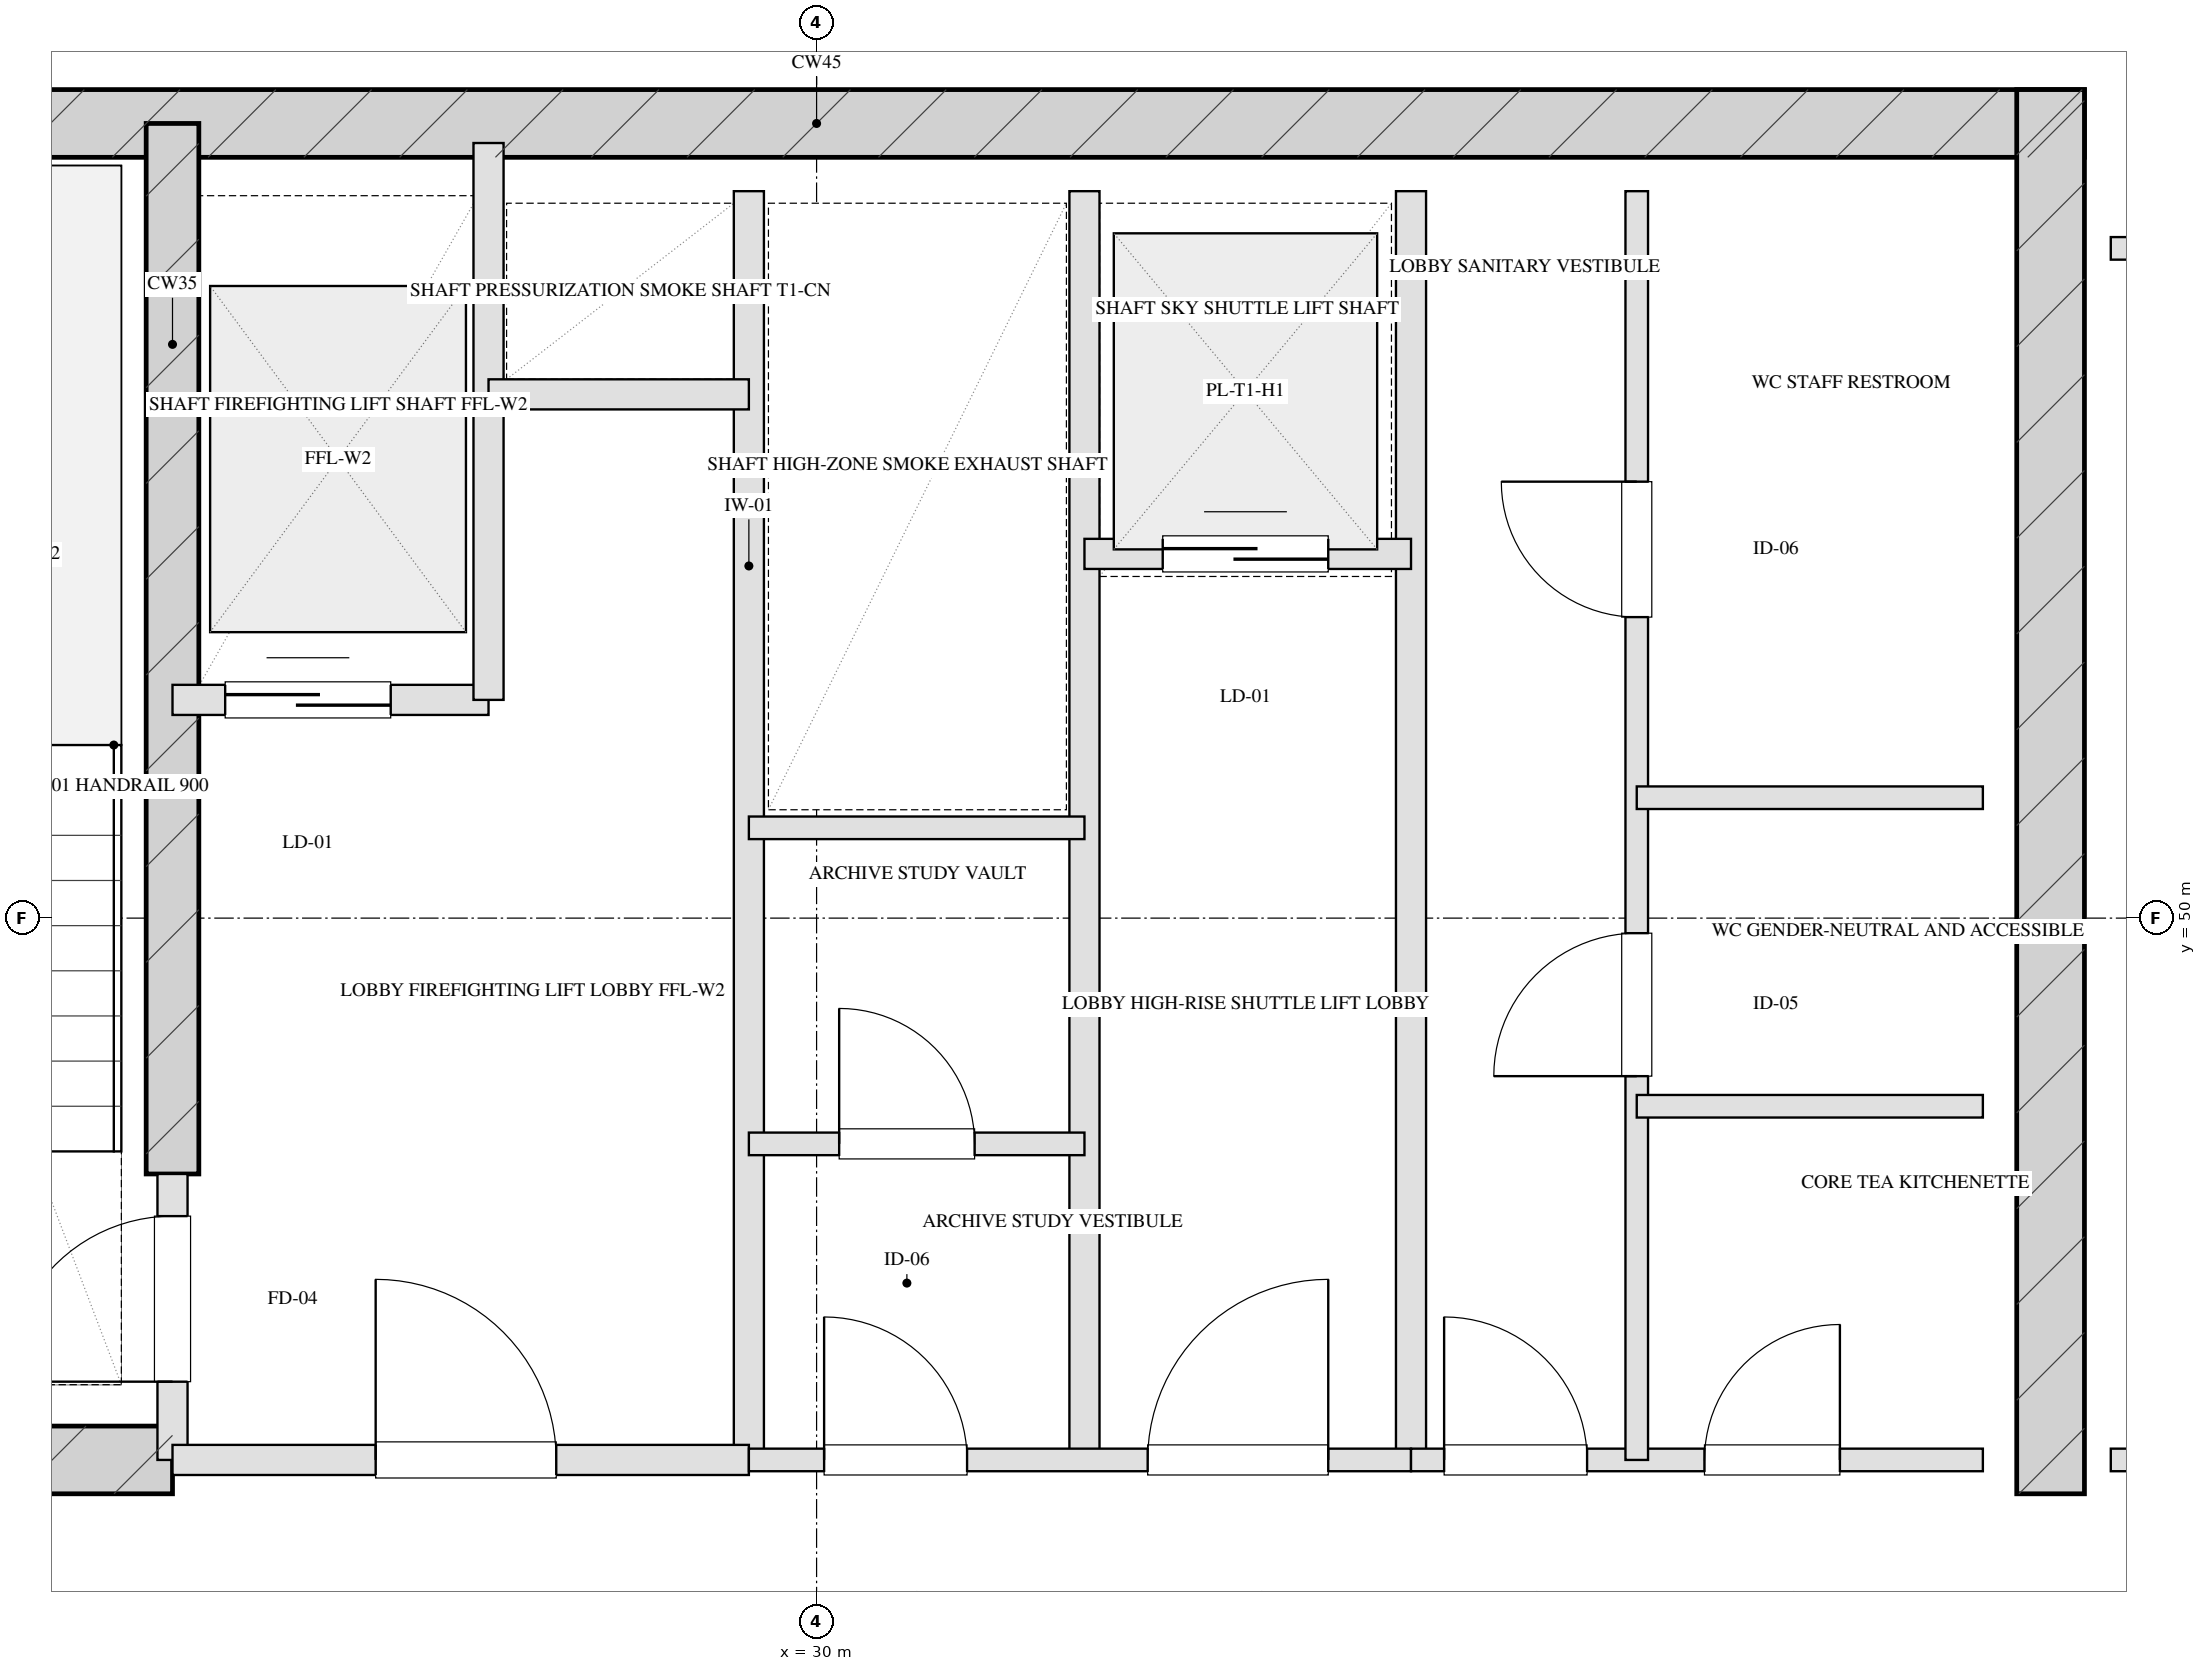
"""IFC4 building model, lengths in metres.
Left out: names, types, materials, properties, quantities, classifications, styles, units other than length and angle.
Written with IfcOpenShell. Run it as: python <this file> out.ifc"""

import sys

from ifc_helpers import new_model, si_unit, direction, frame, frame_2d, origin, place, context, subcontext, project, spatial, rectangle, extrude, element, fill, save


model = new_model("IFC4")
c1 = context("Model", 3, precision=1e-05, world=origin(), true_north=direction((0.0, 1.0)))
c2 = subcontext(c1, "Body", "Model", "MODEL_VIEW")
j1 = project(units=[si_unit("LENGTHUNIT", "METRE"), si_unit("PLANEANGLEUNIT", "RADIAN")], contexts=[c1])
p1 = place(None, origin())
s1 = spatial("IfcSite", under=j1, at=p1, CompositionType="ELEMENT")
p2 = place(p1, origin())
s2 = spatial("IfcBuilding", under=s1, at=p2, CompositionType="ELEMENT")
p3 = place(p2, frame((0.0, 0.0, 223.1)))
s3 = spatial("IfcBuildingStorey", under=s2, at=p3, CompositionType="ELEMENT", Elevation=223.1)
p4 = place(p3, frame((21.575, 55.28, 0.0), z_axis=(0.0, 0.0, 1.0), x_axis=(1.0, 0.0, 0.0)))
e1 = element("IfcWall", 1, at=p4, inside=s3, PredefinedType="SHEAR", context=c2, shape_type="SweptSolid", body=[
    extrude(rectangle(XDim=16.85, YDim=0.45, at=frame_2d((8.425, 0.0))), origin(), (0.0, 0.0, 1.0), 3.45),
])
p5 = place(p3, frame((38.2, 46.175, 0.0), z_axis=(0.0, 0.0, 1.0), x_axis=(0.0, 1.0, 0.0)))
e2 = element("IfcWall", 2, at=p5, inside=s3, PredefinedType="SHEAR", context=c2, shape_type="SweptSolid", body=[
    extrude(rectangle(XDim=9.33, YDim=0.45, at=frame_2d((4.665, 0.0))), origin(), (0.0, 0.0, 1.0), 3.45),
])
p6 = place(p3, frame((25.72, 48.3, 0.0), z_axis=(0.0, 0.0, 1.0), x_axis=(0.0, 1.0, 0.0)))
e3 = element("IfcWall", 3, at=p6, inside=s3, PredefinedType="SHEAR", context=c2, shape_type="SweptSolid", body=[
    extrude(rectangle(XDim=6.98, YDim=0.35, at=frame_2d((3.49, 0.0))), origin(), (0.0, 0.0, 1.0), 3.45),
])
p7 = place(p3, frame((21.575, 46.4, 0.0), z_axis=(0.0, 0.0, 1.0), x_axis=(1.0, 0.0, 0.0)))
e4 = element("IfcWall", 4, at=p7, inside=s3, PredefinedType="SHEAR", context=c2, shape_type="SweptSolid", body=[
    extrude(rectangle(XDim=4.145, YDim=0.45, at=frame_2d((2.073, 0.0))), origin(), (0.0, 0.0, 1.0), 3.45),
])
p8 = place(p3, frame((25.72, 46.4, 0.0), z_axis=(0.0, 0.0, 1.0), x_axis=(0.0, 1.0, 0.0)))
e5 = element("IfcWall", 5, at=p8, inside=s3, PredefinedType="PARTITIONING", context=c2, shape_type="SweptSolid", body=[
    extrude(rectangle(XDim=1.9, YDim=0.2, at=frame_2d((0.95, 0.0))), origin(), (0.0, 0.0, 1.0), 3.175),
])
p9 = place(p8, frame((0.52, 0.0, 0.0)))
e6 = element("IfcOpeningElement", 6, at=p9, cuts=e5, PredefinedType="OPENING", context=c2, shape_type="SweptSolid", body=[
    extrude(rectangle(XDim=1.1, YDim=2.05, at=frame_2d((0.55, 1.025))), frame((0.0, 0.11, 0.0), z_axis=(0.0, -1.0, 0.0), x_axis=(1.0, 0.0, 0.0)), (0.0, 0.0, 1.0), 0.22),
])
p10 = place(p3, frame((29.55, 46.4, 0.0), z_axis=(0.0, 0.0, 1.0), x_axis=(0.0, 1.0, 0.0)))
e7 = element("IfcWall", 7, at=p10, inside=s3, PredefinedType="PARTITIONING", context=c2, shape_type="SweptSolid", body=[
    extrude(rectangle(XDim=8.43, YDim=0.2, at=frame_2d((4.215, 0.0))), origin(), (0.0, 0.0, 1.0), 3.175),
])
p11 = place(p3, frame((25.72, 46.4, 0.0), z_axis=(0.0, 0.0, 1.0), x_axis=(1.0, 0.0, 0.0)))
e8 = element("IfcWall", 8, at=p11, inside=s3, PredefinedType="PARTITIONING", context=c2, shape_type="SweptSolid", body=[
    extrude(rectangle(XDim=3.83, YDim=0.2, at=frame_2d((1.915, 0.0))), origin(), (0.0, 0.0, 1.0), 3.175),
])
p12 = place(p11, frame((1.35, 0.0, 0.0)))
e9 = element("IfcOpeningElement", 9, at=p12, cuts=e8, PredefinedType="OPENING", context=c2, shape_type="SweptSolid", body=[
    extrude(rectangle(XDim=1.2, YDim=2.05, at=frame_2d((0.6, 1.025))), frame((0.0, 0.11, 0.0), z_axis=(0.0, -1.0, 0.0), x_axis=(1.0, 0.0, 0.0)), (0.0, 0.0, 1.0), 0.22),
])
p13 = place(p3, frame((25.72, 51.45, 0.0), z_axis=(0.0, 0.0, 1.0), x_axis=(1.0, 0.0, 0.0)))
e10 = element("IfcWall", 10, at=p13, inside=s3, PredefinedType="PARTITIONING", context=c2, shape_type="SweptSolid", body=[
    extrude(rectangle(XDim=2.1, YDim=0.2, at=frame_2d((1.05, 0.0))), origin(), (0.0, 0.0, 1.0), 3.175),
])
p14 = place(p13, frame((0.35, 0.0, 0.0)))
e11 = element("IfcOpeningElement", 11, at=p14, cuts=e10, PredefinedType="OPENING", context=c2, shape_type="SweptSolid", body=[
    extrude(rectangle(XDim=1.1, YDim=2.05, at=frame_2d((0.55, 1.025))), frame((0.0, 0.11, 0.0), z_axis=(0.0, -1.0, 0.0), x_axis=(1.0, 0.0, 0.0)), (0.0, 0.0, 1.0), 0.22),
])
p15 = place(p3, frame((27.82, 51.45, 0.0), z_axis=(0.0, 0.0, 1.0), x_axis=(0.0, 1.0, 0.0)))
e12 = element("IfcWall", 12, at=p15, inside=s3, PredefinedType="PARTITIONING", context=c2, shape_type="SweptSolid", body=[
    extrude(rectangle(XDim=3.7, YDim=0.2, at=frame_2d((1.85, 0.0))), origin(), (0.0, 0.0, 1.0), 3.175),
])
p16 = place(p3, frame((27.82, 53.48, 0.0), z_axis=(0.0, 0.0, 1.0), x_axis=(1.0, 0.0, 0.0)))
e13 = element("IfcWall", 13, at=p16, inside=s3, PredefinedType="PARTITIONING", context=c2, shape_type="SweptSolid", body=[
    extrude(rectangle(XDim=1.73, YDim=0.2, at=frame_2d((0.865, 0.0))), origin(), (0.0, 0.0, 1.0), 3.175),
])
for number, where, z_axis, x_axis in (
    (14, (33.95, 46.4, 0.0), (0.0, 0.0, 1.0), (0.0, 1.0, 0.0)),
    (15, (31.78, 46.4, 0.0), (0.0, 0.0, 1.0), (0.0, 1.0, 0.0)),
):
    element("IfcWall", number, at=place(p3, frame(where, z_axis=z_axis, x_axis=x_axis)), inside=s3, PredefinedType="PARTITIONING", context=c2, shape_type="SweptSolid", body=[
        extrude(rectangle(XDim=8.43, YDim=0.2, at=frame_2d((4.215, 0.0))), origin(), (0.0, 0.0, 1.0), 3.175),
    ])
p17 = place(p3, frame((29.55, 46.4, 0.0), z_axis=(0.0, 0.0, 1.0), x_axis=(1.0, 0.0, 0.0)))
e16 = element("IfcWall", 16, at=p17, inside=s3, PredefinedType="PARTITIONING", context=c2, shape_type="SweptSolid", body=[
    extrude(rectangle(XDim=4.4, YDim=0.15, at=frame_2d((2.2, 0.0))), origin(), (0.0, 0.0, 1.0), 3.175),
])
p18 = place(p17, frame((0.5, 0.0, 0.0)))
e17 = element("IfcOpeningElement", 17, at=p18, cuts=e16, PredefinedType="OPENING", context=c2, shape_type="SweptSolid", body=[
    extrude(rectangle(XDim=0.95, YDim=2.05, at=frame_2d((0.475, 1.025))), frame((0.0, 0.085, 0.0), z_axis=(0.0, -1.0, 0.0), x_axis=(1.0, 0.0, 0.0)), (0.0, 0.0, 1.0), 0.17),
])
p19 = place(p17, frame((2.65, 0.0, 0.0)))
e18 = element("IfcOpeningElement", 18, at=p19, cuts=e16, PredefinedType="OPENING", context=c2, shape_type="SweptSolid", body=[
    extrude(rectangle(XDim=1.2, YDim=2.05, at=frame_2d((0.6, 1.025))), frame((0.0, 0.085, 0.0), z_axis=(0.0, -1.0, 0.0), x_axis=(1.0, 0.0, 0.0)), (0.0, 0.0, 1.0), 0.17),
])
p20 = place(p3, frame((29.55, 50.6, 0.0), z_axis=(0.0, 0.0, 1.0), x_axis=(1.0, 0.0, 0.0)))
e19 = element("IfcWall", 19, at=p20, inside=s3, PredefinedType="PARTITIONING", context=c2, shape_type="SweptSolid", body=[
    extrude(rectangle(XDim=2.23, YDim=0.15, at=frame_2d((1.115, 0.0))), origin(), (0.0, 0.0, 1.0), 3.175),
])
p21 = place(p3, frame((29.55, 48.5, 0.0), z_axis=(0.0, 0.0, 1.0), x_axis=(1.0, 0.0, 0.0)))
e20 = element("IfcWall", 20, at=p21, inside=s3, PredefinedType="PARTITIONING", context=c2, shape_type="SweptSolid", body=[
    extrude(rectangle(XDim=2.23, YDim=0.15, at=frame_2d((1.115, 0.0))), origin(), (0.0, 0.0, 1.0), 3.175),
])
p22 = place(p21, frame((0.6, 0.0, 0.0)))
e21 = element("IfcOpeningElement", 21, at=p22, cuts=e20, PredefinedType="OPENING", context=c2, shape_type="SweptSolid", body=[
    extrude(rectangle(XDim=0.9, YDim=2.05, at=frame_2d((0.45, 1.025))), frame((0.0, 0.085, 0.0), z_axis=(0.0, -1.0, 0.0), x_axis=(1.0, 0.0, 0.0)), (0.0, 0.0, 1.0), 0.17),
])
p23 = place(p3, frame((31.78, 52.42, 0.0), z_axis=(0.0, 0.0, 1.0), x_axis=(1.0, 0.0, 0.0)))
e22 = element("IfcWall", 22, at=p23, inside=s3, PredefinedType="PARTITIONING", context=c2, shape_type="SweptSolid", body=[
    extrude(rectangle(XDim=2.17, YDim=0.2, at=frame_2d((1.085, 0.0))), origin(), (0.0, 0.0, 1.0), 3.175),
])
p24 = place(p23, frame((0.52, 0.0, 0.0)))
e23 = element("IfcOpeningElement", 23, at=p24, cuts=e22, PredefinedType="OPENING", context=c2, shape_type="SweptSolid", body=[
    extrude(rectangle(XDim=1.1, YDim=2.05, at=frame_2d((0.55, 1.025))), frame((0.0, 0.11, 0.0), z_axis=(0.0, -1.0, 0.0), x_axis=(1.0, 0.0, 0.0)), (0.0, 0.0, 1.0), 0.22),
])
p25 = place(p3, frame((33.95, 46.4, 0.0), z_axis=(0.0, 0.0, 1.0), x_axis=(1.0, 0.0, 0.0)))
e24 = element("IfcWall", 24, at=p25, inside=s3, PredefinedType="PARTITIONING", context=c2, shape_type="SweptSolid", body=[
    extrude(rectangle(XDim=3.8, YDim=0.15, at=frame_2d((1.9, 0.0))), origin(), (0.0, 0.0, 1.0), 3.175),
])
p26 = place(p25, frame((0.22, 0.0, 0.0)))
e25 = element("IfcOpeningElement", 25, at=p26, cuts=e24, PredefinedType="OPENING", context=c2, shape_type="SweptSolid", body=[
    extrude(rectangle(XDim=0.95, YDim=2.05, at=frame_2d((0.475, 1.025))), frame((0.0, 0.085, 0.0), z_axis=(0.0, -1.0, 0.0), x_axis=(1.0, 0.0, 0.0)), (0.0, 0.0, 1.0), 0.17),
])
p27 = place(p25, frame((1.95, 0.0, 0.0)))
e26 = element("IfcOpeningElement", 26, at=p27, cuts=e24, PredefinedType="OPENING", context=c2, shape_type="SweptSolid", body=[
    extrude(rectangle(XDim=0.9, YDim=2.05, at=frame_2d((0.45, 1.025))), frame((0.0, 0.085, 0.0), z_axis=(0.0, -1.0, 0.0), x_axis=(1.0, 0.0, 0.0)), (0.0, 0.0, 1.0), 0.17),
])
p28 = place(p3, frame((35.45, 46.4, 0.0), z_axis=(0.0, 0.0, 1.0), x_axis=(0.0, 1.0, 0.0)))
e27 = element("IfcWall", 27, at=p28, inside=s3, PredefinedType="PARTITIONING", context=c2, shape_type="SweptSolid", body=[
    extrude(rectangle(XDim=8.43, YDim=0.15, at=frame_2d((4.215, 0.0))), origin(), (0.0, 0.0, 1.0), 2.765),
])
p29 = place(p28, frame((2.55, 0.0, 0.0)))
e28 = element("IfcOpeningElement", 28, at=p29, cuts=e27, PredefinedType="OPENING", context=c2, shape_type="SweptSolid", body=[
    extrude(rectangle(XDim=0.95, YDim=2.05, at=frame_2d((0.475, 1.025))), frame((0.0, 0.085, 0.0), z_axis=(0.0, -1.0, 0.0), x_axis=(1.0, 0.0, 0.0)), (0.0, 0.0, 1.0), 0.17),
])
p30 = place(p28, frame((5.6, 0.0, 0.0)))
e29 = element("IfcOpeningElement", 29, at=p30, cuts=e27, PredefinedType="OPENING", context=c2, shape_type="SweptSolid", body=[
    extrude(rectangle(XDim=0.9, YDim=2.05, at=frame_2d((0.45, 1.025))), frame((0.0, 0.085, 0.0), z_axis=(0.0, -1.0, 0.0), x_axis=(1.0, 0.0, 0.0)), (0.0, 0.0, 1.0), 0.17),
])
for number, where, z_axis, x_axis in (
    (30, (35.45, 50.8, 0.0), (0.0, 0.0, 1.0), (1.0, 0.0, 0.0)),
    (31, (35.45, 48.75, 0.0), (0.0, 0.0, 1.0), (1.0, 0.0, 0.0)),
):
    element("IfcWall", number, at=place(p3, frame(where, z_axis=z_axis, x_axis=x_axis)), inside=s3, PredefinedType="PARTITIONING", context=c2, shape_type="SweptSolid", body=[
        extrude(rectangle(XDim=2.3, YDim=0.15, at=frame_2d((1.15, 0.0))), origin(), (0.0, 0.0, 1.0), 3.175),
    ])
p31 = place(p3, frame((38.6, 54.45, 0.0), z_axis=(0.0, 0.0, 1.0), x_axis=(1.0, 0.0, 0.0)))
e32 = element("IfcWall", 32, at=p31, inside=s3, PredefinedType="PARTITIONING", context=c2, shape_type="SweptSolid", body=[
    extrude(rectangle(XDim=6.4, YDim=0.15, at=frame_2d((3.2, 0.0))), origin(), (0.0, 0.0, 1.0), 3.175),
])
p32 = place(p3, frame((38.6, 46.4, 0.0), z_axis=(0.0, 0.0, 1.0), x_axis=(1.0, 0.0, 0.0)))
e33 = element("IfcWall", 33, at=p32, inside=s3, PredefinedType="PARTITIONING", context=c2, shape_type="SweptSolid", body=[
    extrude(rectangle(XDim=6.4, YDim=0.15, at=frame_2d((3.2, 0.0))), origin(), (0.0, 0.0, 1.0), 3.175),
])
p33 = place(p32, frame((2.688, 0.0, 0.0)))
e34 = element("IfcOpeningElement", 34, at=p33, cuts=e33, PredefinedType="OPENING", context=c2, shape_type="SweptSolid", body=[
    extrude(rectangle(XDim=1.0, YDim=2.05, at=frame_2d((0.5, 1.025))), frame((0.0, 0.085, 0.0), z_axis=(0.0, -1.0, 0.0), x_axis=(1.0, 0.0, 0.0)), (0.0, 0.0, 1.0), 0.17),
])
p34 = place(p9, origin())
e35 = element("IfcDoor", 35, at=p34, inside=s3, OperationType="SINGLE_SWING_LEFT", PredefinedType="DOOR", context=c2, shape_type="SweptSolid", body=[
    extrude(rectangle(XDim=1.1, YDim=2.05, at=frame_2d((0.55, 1.025))), frame((0.0, 0.025, 0.0), z_axis=(0.0, -1.0, 0.0), x_axis=(1.0, 0.0, 0.0)), (0.0, 0.0, 1.0), 0.05),
])
fill(e6, e35)
p35 = place(p12, origin())
e36 = element("IfcDoor", 36, at=p35, inside=s3, OperationType="SINGLE_SWING_LEFT", PredefinedType="DOOR", context=c2, shape_type="SweptSolid", body=[
    extrude(rectangle(XDim=1.2, YDim=2.05, at=frame_2d((0.6, 1.025))), frame((0.0, 0.025, 0.0), z_axis=(0.0, -1.0, 0.0), x_axis=(1.0, 0.0, 0.0)), (0.0, 0.0, 1.0), 0.05),
])
fill(e9, e36)
p36 = place(p14, origin())
e37 = element("IfcDoor", 37, at=p36, inside=s3, OperationType="DOUBLE_DOOR_SLIDING", PredefinedType="DOOR", context=c2, shape_type="SweptSolid", body=[
    extrude(rectangle(XDim=1.1, YDim=2.05, at=frame_2d((0.55, 1.025))), frame((0.0, 0.025, 0.0), z_axis=(0.0, -1.0, 0.0), x_axis=(1.0, 0.0, 0.0)), (0.0, 0.0, 1.0), 0.05),
])
fill(e11, e37)
p37 = place(p18, origin())
e38 = element("IfcDoor", 38, at=p37, inside=s3, OperationType="SINGLE_SWING_LEFT", PredefinedType="DOOR", context=c2, shape_type="SweptSolid", body=[
    extrude(rectangle(XDim=0.95, YDim=2.05, at=frame_2d((0.475, 1.025))), frame((0.0, 0.025, 0.0), z_axis=(0.0, -1.0, 0.0), x_axis=(1.0, 0.0, 0.0)), (0.0, 0.0, 1.0), 0.05),
])
fill(e17, e38)
p38 = place(p19, origin())
e39 = element("IfcDoor", 39, at=p38, inside=s3, OperationType="SINGLE_SWING_RIGHT", PredefinedType="DOOR", context=c2, shape_type="SweptSolid", body=[
    extrude(rectangle(XDim=1.2, YDim=2.05, at=frame_2d((0.6, 1.025))), frame((0.0, 0.025, 0.0), z_axis=(0.0, -1.0, 0.0), x_axis=(1.0, 0.0, 0.0)), (0.0, 0.0, 1.0), 0.05),
])
fill(e18, e39)
p39 = place(p22, origin())
e40 = element("IfcDoor", 40, at=p39, inside=s3, OperationType="SINGLE_SWING_LEFT", PredefinedType="DOOR", context=c2, shape_type="SweptSolid", body=[
    extrude(rectangle(XDim=0.9, YDim=2.05, at=frame_2d((0.45, 1.025))), frame((0.0, 0.025, 0.0), z_axis=(0.0, -1.0, 0.0), x_axis=(1.0, 0.0, 0.0)), (0.0, 0.0, 1.0), 0.05),
])
fill(e21, e40)
p40 = place(p24, origin())
e41 = element("IfcDoor", 41, at=p40, inside=s3, OperationType="DOUBLE_DOOR_SLIDING", PredefinedType="DOOR", context=c2, shape_type="SweptSolid", body=[
    extrude(rectangle(XDim=1.1, YDim=2.05, at=frame_2d((0.55, 1.025))), frame((0.0, 0.025, 0.0), z_axis=(0.0, -1.0, 0.0), x_axis=(1.0, 0.0, 0.0)), (0.0, 0.0, 1.0), 0.05),
])
fill(e23, e41)
p41 = place(p26, origin())
e42 = element("IfcDoor", 42, at=p41, inside=s3, OperationType="SINGLE_SWING_LEFT", PredefinedType="DOOR", context=c2, shape_type="SweptSolid", body=[
    extrude(rectangle(XDim=0.95, YDim=2.05, at=frame_2d((0.475, 1.025))), frame((0.0, 0.025, 0.0), z_axis=(0.0, -1.0, 0.0), x_axis=(1.0, 0.0, 0.0)), (0.0, 0.0, 1.0), 0.05),
])
fill(e25, e42)
p42 = place(p27, origin())
e43 = element("IfcDoor", 43, at=p42, inside=s3, OperationType="SINGLE_SWING_RIGHT", PredefinedType="DOOR", context=c2, shape_type="SweptSolid", body=[
    extrude(rectangle(XDim=0.9, YDim=2.05, at=frame_2d((0.45, 1.025))), frame((0.0, 0.025, 0.0), z_axis=(0.0, -1.0, 0.0), x_axis=(1.0, 0.0, 0.0)), (0.0, 0.0, 1.0), 0.05),
])
fill(e26, e43)
p43 = place(p29, origin())
e44 = element("IfcDoor", 44, at=p43, inside=s3, OperationType="SINGLE_SWING_LEFT", PredefinedType="DOOR", context=c2, shape_type="SweptSolid", body=[
    extrude(rectangle(XDim=0.95, YDim=2.05, at=frame_2d((0.475, 1.025))), frame((0.0, 0.025, 0.0), z_axis=(0.0, -1.0, 0.0), x_axis=(1.0, 0.0, 0.0)), (0.0, 0.0, 1.0), 0.05),
])
fill(e28, e44)
p44 = place(p30, origin())
e45 = element("IfcDoor", 45, at=p44, inside=s3, OperationType="SINGLE_SWING_RIGHT", PredefinedType="DOOR", context=c2, shape_type="SweptSolid", body=[
    extrude(rectangle(XDim=0.9, YDim=2.05, at=frame_2d((0.45, 1.025))), frame((0.0, 0.025, 0.0), z_axis=(0.0, -1.0, 0.0), x_axis=(1.0, 0.0, 0.0)), (0.0, 0.0, 1.0), 0.05),
])
fill(e29, e45)
save(model, sys.argv[1])
